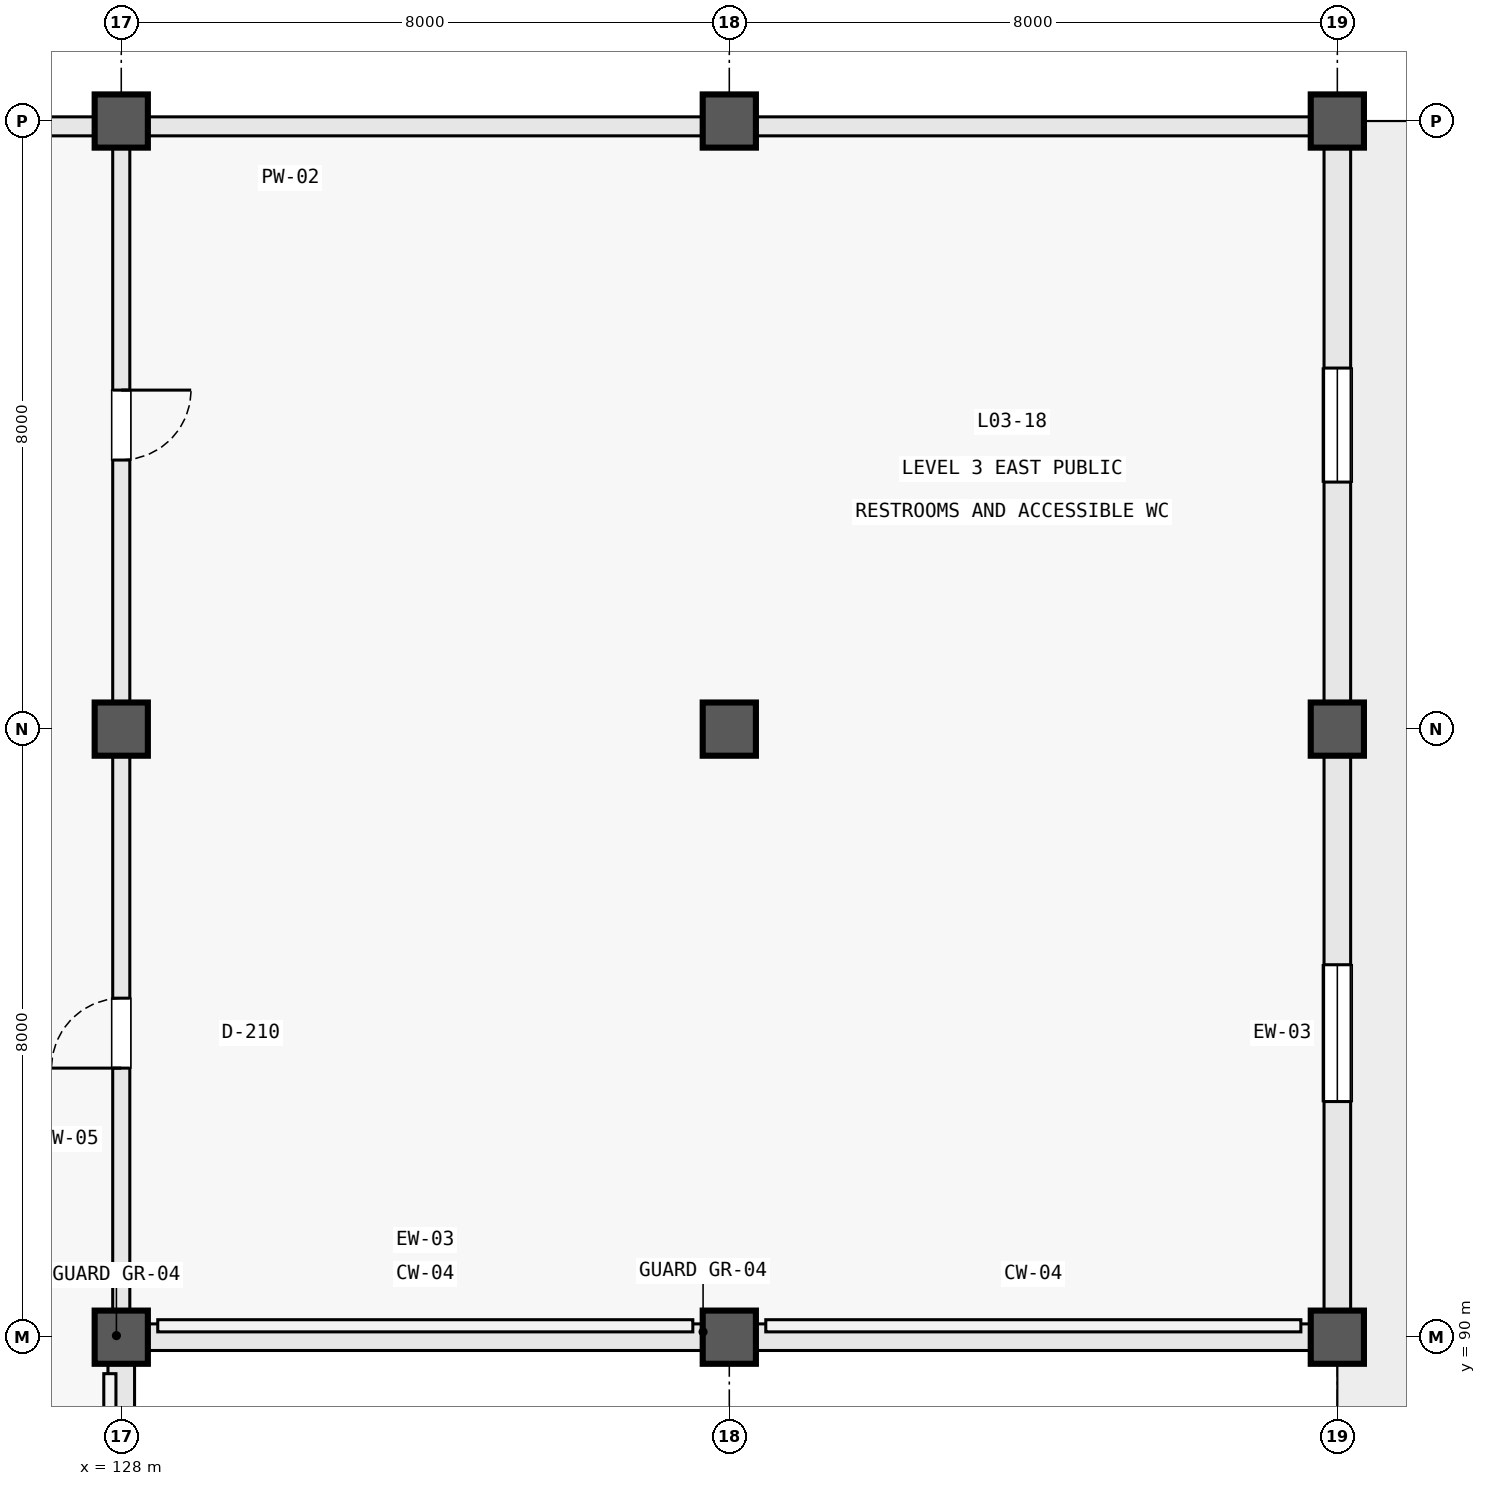
"""IFC4 building model, lengths in metres.
Left out: names, types, materials, properties, quantities, classifications, styles, units other than length and angle.
Written with IfcOpenShell. Run it as: python <this file> out.ifc"""

import sys

from ifc_helpers import new_model, si_unit, direction, frame, frame_2d, origin, origin_2d, place, context, subcontext, project, spatial, rectangle, extrude, element, fill, save


model = new_model("IFC4")
c1 = context("Model", 3, precision=1e-05, world=origin(), true_north=direction((0.0, 1.0)))
c2 = subcontext(c1, "Body", "Model", "MODEL_VIEW")
j1 = project(units=[si_unit("LENGTHUNIT", "METRE"), si_unit("PLANEANGLEUNIT", "RADIAN")], contexts=[c1])
p1 = place(None, origin())
s1 = spatial("IfcSite", under=j1, at=p1, CompositionType="ELEMENT")
p2 = place(p1, origin())
s2 = spatial("IfcBuilding", under=s1, at=p2, CompositionType="ELEMENT")
p3 = place(p2, frame((0.0, 0.0, 10.5)))
s3 = spatial("IfcBuildingStorey", under=s2, at=p3, CompositionType="ELEMENT", Elevation=10.5)
for number, where, z_axis, x_axis in (
    (1, (128.0, 90.0, 0.0), (0.0, 0.0, 1.0), (1.0, 0.0, 0.0)),
    (2, (128.0, 98.0, 0.0), (0.0, 0.0, 1.0), (1.0, 0.0, 0.0)),
    (3, (128.0, 106.0, 0.0), (0.0, 0.0, 1.0), (1.0, 0.0, 0.0)),
    (4, (136.0, 90.0, 0.0), (0.0, 0.0, 1.0), (1.0, 0.0, 0.0)),
    (5, (136.0, 98.0, 0.0), (0.0, 0.0, 1.0), (1.0, 0.0, 0.0)),
    (6, (136.0, 106.0, 0.0), (0.0, 0.0, 1.0), (1.0, 0.0, 0.0)),
    (7, (144.0, 90.0, 0.0), (0.0, 0.0, 1.0), (1.0, 0.0, 0.0)),
    (8, (144.0, 98.0, 0.0), (0.0, 0.0, 1.0), (1.0, 0.0, 0.0)),
    (9, (144.0, 106.0, 0.0), (0.0, 0.0, 1.0), (1.0, 0.0, 0.0)),
):
    element("IfcColumn", number, at=place(p3, frame(where, z_axis=z_axis, x_axis=x_axis)), inside=s3, PredefinedType="COLUMN", context=c2, shape_type="SweptSolid", body=[
        extrude(rectangle(XDim=0.7, YDim=0.7, at=origin_2d()), origin(), (0.0, 0.0, 1.0), 4.8),
    ])
p4 = place(p3, frame((128.0, 82.345, 0.0), z_axis=(0.0, 0.0, 1.0), x_axis=(0.0, 1.0, 0.0)))
e10 = element("IfcWall", 10, at=p4, inside=s3, PredefinedType="STANDARD", context=c2, shape_type="SweptSolid", body=[
    extrude(rectangle(XDim=7.31, YDim=0.35, at=frame_2d((3.655, 0.0))), origin(), (0.0, 0.0, 1.0), 3.52),
])
p5 = place(p4, frame((2.605, 0.0, 0.72)))
e11 = element("IfcOpeningElement", 11, at=p5, cuts=e10, PredefinedType="OPENING", context=c2, shape_type="SweptSolid", body=[
    extrude(rectangle(XDim=2.1, YDim=1.85, at=frame_2d((1.05, 0.925))), frame((0.0, 0.187, 0.0), z_axis=(0.0, -1.0, 0.0), x_axis=(1.0, 0.0, 0.0)), (0.0, 0.0, 1.0), 0.374),
])
p6 = place(p3, frame((144.0, 90.345, 0.0), z_axis=(0.0, 0.0, 1.0), x_axis=(0.0, 1.0, 0.0)))
e12 = element("IfcWall", 12, at=p6, inside=s3, PredefinedType="STANDARD", context=c2, shape_type="SweptSolid", body=[
    extrude(rectangle(XDim=7.31, YDim=0.35, at=frame_2d((3.655, 0.0))), origin(), (0.0, 0.0, 1.0), 3.52),
])
p7 = place(p6, frame((2.755, 0.0, 0.72)))
e13 = element("IfcOpeningElement", 13, at=p7, cuts=e12, PredefinedType="OPENING", context=c2, shape_type="SweptSolid", body=[
    extrude(rectangle(XDim=1.8, YDim=2.1, at=frame_2d((0.9, 1.05))), frame((0.0, 0.187, 0.0), z_axis=(0.0, -1.0, 0.0), x_axis=(1.0, 0.0, 0.0)), (0.0, 0.0, 1.0), 0.374),
])
p8 = place(p3, frame((144.0, 98.345, 0.0), z_axis=(0.0, 0.0, 1.0), x_axis=(0.0, 1.0, 0.0)))
e14 = element("IfcWall", 14, at=p8, inside=s3, PredefinedType="STANDARD", context=c2, shape_type="SweptSolid", body=[
    extrude(rectangle(XDim=7.31, YDim=0.35, at=frame_2d((3.655, 0.0))), origin(), (0.0, 0.0, 1.0), 3.52),
])
p9 = place(p8, frame((2.905, 0.0, 0.72)))
e15 = element("IfcOpeningElement", 15, at=p9, cuts=e14, PredefinedType="OPENING", context=c2, shape_type="SweptSolid", body=[
    extrude(rectangle(XDim=1.5, YDim=1.8, at=frame_2d((0.75, 0.9))), frame((0.0, 0.187, 0.0), z_axis=(0.0, -1.0, 0.0), x_axis=(1.0, 0.0, 0.0)), (0.0, 0.0, 1.0), 0.374),
])
for number, where, z_axis, x_axis in (
    (16, (128.345, 90.0, 0.0), (0.0, 0.0, 1.0), (1.0, 0.0, 0.0)),
    (17, (136.345, 90.0, 0.0), (0.0, 0.0, 1.0), (1.0, 0.0, 0.0)),
):
    element("IfcWall", number, at=place(p3, frame(where, z_axis=z_axis, x_axis=x_axis)), inside=s3, PredefinedType="STANDARD", context=c2, shape_type="SweptSolid", body=[
        extrude(rectangle(XDim=7.31, YDim=0.35, at=frame_2d((3.655, 0.0))), origin(), (0.0, 0.0, 1.0), 3.52),
    ])
p10 = place(p3, frame((128.0, 90.36, 0.0), z_axis=(0.0, 0.0, 1.0), x_axis=(0.0, 1.0, 0.0)))
e18 = element("IfcWall", 18, at=p10, inside=s3, PredefinedType="PARTITIONING", context=c2, shape_type="SweptSolid", body=[
    extrude(rectangle(XDim=7.28, YDim=0.225, at=frame_2d((3.64, 0.0))), origin(), (0.0, 0.0, 1.0), 3.33),
])
p11 = place(p10, frame((3.18, 0.0, 0.0)))
e19 = element("IfcOpeningElement", 19, at=p11, cuts=e18, PredefinedType="OPENING", context=c2, shape_type="SweptSolid", body=[
    extrude(rectangle(XDim=0.92, YDim=2.1, at=frame_2d((0.46, 1.05))), frame((0.0, 0.125, 0.0), z_axis=(0.0, -1.0, 0.0), x_axis=(1.0, 0.0, 0.0)), (0.0, 0.0, 1.0), 0.249),
])
p12 = place(p3, frame((128.0, 98.36, 0.0), z_axis=(0.0, 0.0, 1.0), x_axis=(0.0, 1.0, 0.0)))
e20 = element("IfcWall", 20, at=p12, inside=s3, PredefinedType="PARTITIONING", context=c2, shape_type="SweptSolid", body=[
    extrude(rectangle(XDim=7.28, YDim=0.225, at=frame_2d((3.64, 0.0))), origin(), (0.0, 0.0, 1.0), 3.33),
])
p13 = place(p12, frame((3.18, 0.0, 0.0)))
e21 = element("IfcOpeningElement", 21, at=p13, cuts=e20, PredefinedType="OPENING", context=c2, shape_type="SweptSolid", body=[
    extrude(rectangle(XDim=0.92, YDim=2.1, at=frame_2d((0.46, 1.05))), frame((0.0, 0.125, 0.0), z_axis=(0.0, -1.0, 0.0), x_axis=(1.0, 0.0, 0.0)), (0.0, 0.0, 1.0), 0.249),
])
p14 = place(p3, frame((112.2, 105.93, 0.0), z_axis=(0.0, 0.0, 1.0), x_axis=(0.99999999997, 7.696748e-06, 0.0)))
e22 = element("IfcWall", 22, at=p14, inside=s3, PredefinedType="PARAPET", context=c2, shape_type="SweptSolid", body=[
    extrude(rectangle(XDim=31.72, YDim=0.25, at=frame_2d((15.86, 0.0))), origin(), (0.0, 0.0, 1.0), 1.15),
])
p15 = place(p7, origin())
e23 = element("IfcWindow", 23, at=p15, inside=s3, PartitioningType="SINGLE_PANEL", PredefinedType="WINDOW", context=c2, shape_type="SweptSolid", body=[
    extrude(rectangle(XDim=1.8, YDim=2.1, at=frame_2d((0.9, 1.05))), frame((0.0, 0.03, 0.0), z_axis=(0.0, -1.0, 0.0), x_axis=(1.0, 0.0, 0.0)), (0.0, 0.0, 1.0), 0.06),
])
fill(e13, e23)
p16 = place(p9, origin())
e24 = element("IfcWindow", 24, at=p16, inside=s3, PartitioningType="SINGLE_PANEL", PredefinedType="WINDOW", context=c2, shape_type="SweptSolid", body=[
    extrude(rectangle(XDim=1.5, YDim=1.8, at=frame_2d((0.75, 0.9))), frame((0.0, 0.03, 0.0), z_axis=(0.0, -1.0, 0.0), x_axis=(1.0, 0.0, 0.0)), (0.0, 0.0, 1.0), 0.06),
])
fill(e15, e24)
p17 = place(p11, origin())
e25 = element("IfcDoor", 25, at=p17, inside=s3, OperationType="SINGLE_SWING_LEFT", PredefinedType="DOOR", context=c2, shape_type="SweptSolid", body=[
    extrude(rectangle(XDim=0.92, YDim=2.1, at=frame_2d((0.46, 1.05))), frame((0.0, 0.025, 0.0), z_axis=(0.0, -1.0, 0.0), x_axis=(1.0, 0.0, 0.0)), (0.0, 0.0, 1.0), 0.05),
])
fill(e19, e25)
p18 = place(p13, frame((0.92, 0.0, 0.0), z_axis=(0.0, 0.0, 1.0), x_axis=(-1.0, 0.0, 0.0)))
e26 = element("IfcDoor", 26, at=p18, inside=s3, OperationType="SINGLE_SWING_RIGHT", PredefinedType="DOOR", context=c2, shape_type="SweptSolid", body=[
    extrude(rectangle(XDim=0.92, YDim=2.1, at=frame_2d((0.46, 1.05))), frame((0.0, 0.025, 0.0), z_axis=(0.0, -1.0, 0.0), x_axis=(1.0, 0.0, 0.0)), (0.0, 0.0, 1.0), 0.05),
])
fill(e21, e26)
save(model, sys.argv[1])
